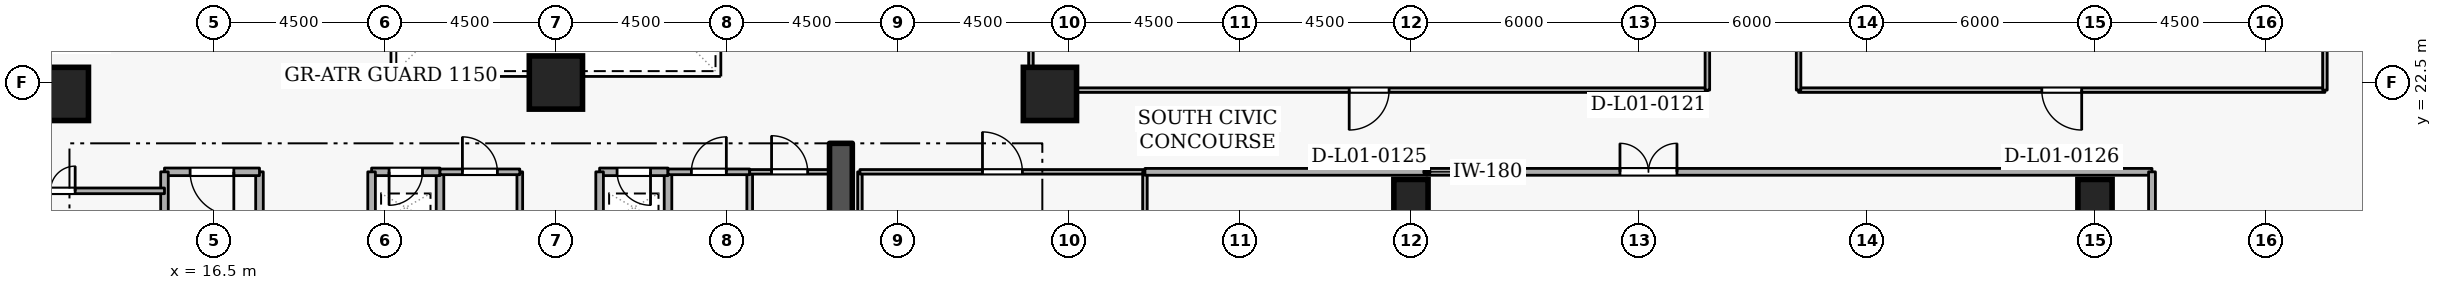
"""IFC4 building model, lengths in metres.
Left out: names, types, materials, properties, quantities, classifications, styles, units other than length and angle.
Written with IfcOpenShell. Run it as: python <this file> out.ifc"""

import sys

from ifc_helpers import new_model, si_unit, direction, frame, frame_2d, origin, origin_2d, place, context, subcontext, project, spatial, rectangle, extrude, element, fill, save


model = new_model("IFC4")
c1 = context("Model", 3, precision=1e-05, world=origin(), true_north=direction((0.0, 1.0)))
c2 = subcontext(c1, "Body", "Model", "MODEL_VIEW")
j1 = project(units=[si_unit("LENGTHUNIT", "METRE"), si_unit("PLANEANGLEUNIT", "RADIAN")], contexts=[c1])
p1 = place(None, origin())
s1 = spatial("IfcSite", under=j1, at=p1, CompositionType="ELEMENT")
p2 = place(p1, origin())
s2 = spatial("IfcBuilding", under=s1, at=p2, CompositionType="ELEMENT")
p3 = place(p2, frame((0.0, 0.0, 4.8)))
s3 = spatial("IfcBuildingStorey", under=s2, at=p3, CompositionType="ELEMENT", Elevation=4.8)
p4 = place(p3, frame((33.0, 15.2, 0.0), z_axis=(0.0, 0.0, 1.0), x_axis=(0.0, 1.0, 0.0)))
e1 = element("IfcWall", 1, at=p4, inside=s3, PredefinedType="SHEAR", context=c2, shape_type="SweptSolid", body=[
    extrude(rectangle(XDim=5.7, YDim=0.6, at=frame_2d((2.85, 0.0))), origin(), (0.0, 0.0, 1.0), 4.8),
])
for number, where, z_axis, x_axis in (
    (2, (12.5, 22.2, 0.0), (0.0, 0.0, 1.0), (1.0, 0.0, 0.0)),
    (3, (38.5, 22.2, 0.0), (0.0, 0.0, 1.0), (1.0, 0.0, 0.0)),
    (4, (25.5, 22.5, 0.0), (0.0, 0.0, 1.0), (1.0, 0.0, 0.0)),
):
    element("IfcColumn", number, at=place(p3, frame(where, z_axis=z_axis, x_axis=x_axis)), inside=s3, PredefinedType="COLUMN", context=c2, shape_type="SweptSolid", body=[
        extrude(rectangle(XDim=1.4, YDim=1.4, at=origin_2d()), origin(), (0.0, 0.0, 1.0), 4.8),
    ])
for number, where, z_axis, x_axis in (
    (5, (48.0, 19.5, 0.0), (0.0, 0.0, 1.0), (1.0, 0.0, 0.0)),
    (6, (66.0, 19.5, 0.0), (0.0, 0.0, 1.0), (1.0, 0.0, 0.0)),
):
    element("IfcColumn", number, at=place(p3, frame(where, z_axis=z_axis, x_axis=x_axis)), inside=s3, PredefinedType="COLUMN", context=c2, shape_type="SweptSolid", body=[
        extrude(rectangle(XDim=0.9, YDim=0.9, at=origin_2d()), origin(), (0.0, 0.0, 1.0), 4.8),
    ])
p5 = place(p3, frame((17.7, 18.4, 0.0), z_axis=(0.0, 0.0, 1.0), x_axis=(0.0, 1.0, 0.0)))
e7 = element("IfcWall", 7, at=p5, inside=s3, PredefinedType="STANDARD", context=c2, shape_type="SweptSolid", body=[
    extrude(rectangle(XDim=1.75, YDim=0.2, at=frame_2d((0.875, 0.0))), origin(), (0.0, 0.0, 1.0), 3.665),
])
p6 = place(p3, frame((17.7, 20.15, 0.0), z_axis=(0.0, 0.0, 1.0), x_axis=(-1.0, 0.0, 0.0)))
e8 = element("IfcWall", 8, at=p6, inside=s3, PredefinedType="STANDARD", context=c2, shape_type="SweptSolid", body=[
    extrude(rectangle(XDim=2.5, YDim=0.2, at=frame_2d((1.25, 0.0))), origin(), (0.0, 0.0, 1.0), 4.46),
])
p7 = place(p6, frame((0.675, 0.0, 0.0)))
e9 = element("IfcOpeningElement", 9, at=p7, cuts=e8, PredefinedType="OPENING", context=c2, shape_type="SweptSolid", body=[
    extrude(rectangle(XDim=1.15, YDim=2.1, at=frame_2d((0.575, 1.05))), frame((0.0, 0.11, 0.0), z_axis=(0.0, -1.0, 0.0), x_axis=(1.0, 0.0, 0.0)), (0.0, 0.0, 1.0), 0.22),
])
p8 = place(p3, frame((15.2, 20.15, 0.0), z_axis=(0.0, 0.0, 1.0), x_axis=(0.0, -1.0, 0.0)))
e10 = element("IfcWall", 10, at=p8, inside=s3, PredefinedType="STANDARD", context=c2, shape_type="SweptSolid", body=[
    extrude(rectangle(XDim=5.15, YDim=0.2, at=frame_2d((2.575, 0.0))), origin(), (0.0, 0.0, 1.0), 4.46),
])
p9 = place(p3, frame((28.45, 18.65, 0.0), z_axis=(0.0, 0.0, 1.0), x_axis=(0.0, 1.0, 0.0)))
e11 = element("IfcWall", 11, at=p9, inside=s3, PredefinedType="STANDARD", context=c2, shape_type="SweptSolid", body=[
    extrude(rectangle(XDim=1.5, YDim=0.2, at=frame_2d((0.75, 0.0))), origin(), (0.0, 0.0, 1.0), 4.46),
])
p10 = place(p3, frame((28.45, 20.15, 0.0), z_axis=(0.0, 0.0, 1.0), x_axis=(-1.0, 0.0, 0.0)))
e12 = element("IfcWall", 12, at=p10, inside=s3, PredefinedType="STANDARD", context=c2, shape_type="SweptSolid", body=[
    extrude(rectangle(XDim=1.8, YDim=0.2, at=frame_2d((0.9, 0.0))), origin(), (0.0, 0.0, 1.0), 4.46),
])
p11 = place(p10, frame((0.46, 0.0, 0.0)))
e13 = element("IfcOpeningElement", 13, at=p11, cuts=e12, PredefinedType="OPENING", context=c2, shape_type="SweptSolid", body=[
    extrude(rectangle(XDim=0.88, YDim=2.04, at=frame_2d((0.44, 1.02))), frame((0.0, 0.11, 0.0), z_axis=(0.0, -1.0, 0.0), x_axis=(1.0, 0.0, 0.0)), (0.0, 0.0, 1.0), 0.22),
])
for number, where, z_axis, x_axis in (
    (14, (26.65, 20.15, 0.0), (0.0, 0.0, 1.0), (0.0, -1.0, 0.0)),
    (15, (22.45, 18.65, 0.0), (0.0, 0.0, 1.0), (0.0, 1.0, 0.0)),
):
    element("IfcWall", number, at=place(p3, frame(where, z_axis=z_axis, x_axis=x_axis)), inside=s3, PredefinedType="STANDARD", context=c2, shape_type="SweptSolid", body=[
        extrude(rectangle(XDim=1.5, YDim=0.2, at=frame_2d((0.75, 0.0))), origin(), (0.0, 0.0, 1.0), 4.46),
    ])
p12 = place(p3, frame((22.45, 20.15, 0.0), z_axis=(0.0, 0.0, 1.0), x_axis=(-1.0, 0.0, 0.0)))
e16 = element("IfcWall", 16, at=p12, inside=s3, PredefinedType="STANDARD", context=c2, shape_type="SweptSolid", body=[
    extrude(rectangle(XDim=1.8, YDim=0.2, at=frame_2d((0.9, 0.0))), origin(), (0.0, 0.0, 1.0), 4.46),
])
p13 = place(p12, frame((0.46, 0.0, 0.0)))
e17 = element("IfcOpeningElement", 17, at=p13, cuts=e16, PredefinedType="OPENING", context=c2, shape_type="SweptSolid", body=[
    extrude(rectangle(XDim=0.88, YDim=2.04, at=frame_2d((0.44, 1.02))), frame((0.0, 0.11, 0.0), z_axis=(0.0, -1.0, 0.0), x_axis=(1.0, 0.0, 0.0)), (0.0, 0.0, 1.0), 0.22),
])
p14 = place(p3, frame((20.65, 20.15, 0.0), z_axis=(0.0, 0.0, 1.0), x_axis=(0.0, -1.0, 0.0)))
e18 = element("IfcWall", 18, at=p14, inside=s3, PredefinedType="STANDARD", context=c2, shape_type="SweptSolid", body=[
    extrude(rectangle(XDim=1.5, YDim=0.2, at=frame_2d((0.75, 0.0))), origin(), (0.0, 0.0, 1.0), 4.46),
])
p15 = place(p3, frame((24.55, 20.15, 0.0), z_axis=(0.0, 0.0, 1.0), x_axis=(0.0, -1.0, 0.0)))
e19 = element("IfcWall", 19, at=p15, inside=s3, PredefinedType="PARTITIONING", context=c2, shape_type="SweptSolid", body=[
    extrude(rectangle(XDim=1.5, YDim=0.15, at=frame_2d((0.75, 0.0))), origin(), (0.0, 0.0, 1.0), 4.46),
])
p16 = place(p3, frame((22.45, 20.15, 0.0), z_axis=(0.0, 0.0, 1.0), x_axis=(1.0, 0.0, 0.0)))
e20 = element("IfcWall", 20, at=p16, inside=s3, PredefinedType="PARTITIONING", context=c2, shape_type="SweptSolid", body=[
    extrude(rectangle(XDim=2.1, YDim=0.15, at=frame_2d((1.05, 0.0))), origin(), (0.0, 0.0, 1.0), 4.46),
])
p17 = place(p16, frame((0.59, 0.0, 0.0)))
e21 = element("IfcOpeningElement", 21, at=p17, cuts=e20, PredefinedType="OPENING", context=c2, shape_type="SweptSolid", body=[
    extrude(rectangle(XDim=0.92, YDim=2.08, at=frame_2d((0.46, 1.04))), frame((0.0, 0.085, 0.0), z_axis=(0.0, -1.0, 0.0), x_axis=(1.0, 0.0, 0.0)), (0.0, 0.0, 1.0), 0.17),
])
p18 = place(p3, frame((30.6, 20.15, 0.0), z_axis=(0.0, 0.0, 1.0), x_axis=(0.0, -1.0, 0.0)))
e22 = element("IfcWall", 22, at=p18, inside=s3, PredefinedType="PARTITIONING", context=c2, shape_type="SweptSolid", body=[
    extrude(rectangle(XDim=1.5, YDim=0.15, at=frame_2d((0.75, 0.0))), origin(), (0.0, 0.0, 1.0), 4.46),
])
p19 = place(p3, frame((28.45, 20.15, 0.0), z_axis=(0.0, 0.0, 1.0), x_axis=(1.0, 0.0, 0.0)))
e23 = element("IfcWall", 23, at=p19, inside=s3, PredefinedType="PARTITIONING", context=c2, shape_type="SweptSolid", body=[
    extrude(rectangle(XDim=2.15, YDim=0.15, at=frame_2d((1.075, 0.0))), origin(), (0.0, 0.0, 1.0), 4.46),
])
p20 = place(p19, frame((0.615, 0.0, 0.0)))
e24 = element("IfcOpeningElement", 24, at=p20, cuts=e23, PredefinedType="OPENING", context=c2, shape_type="SweptSolid", body=[
    extrude(rectangle(XDim=0.92, YDim=2.08, at=frame_2d((0.46, 1.04))), frame((0.0, 0.085, 0.0), z_axis=(0.0, -1.0, 0.0), x_axis=(1.0, 0.0, 0.0)), (0.0, 0.0, 1.0), 0.17),
])
p21 = place(p3, frame((30.6, 20.15, 0.0), z_axis=(0.0, 0.0, 1.0), x_axis=(1.0, 0.0, 0.0)))
e25 = element("IfcWall", 25, at=p21, inside=s3, PredefinedType="PARTITIONING", context=c2, shape_type="SweptSolid", body=[
    extrude(rectangle(XDim=2.1, YDim=0.12, at=frame_2d((1.05, 0.0))), origin(), (0.0, 0.0, 1.0), 4.46),
])
p22 = place(p21, frame((0.575, 0.0, 0.0)))
e26 = element("IfcOpeningElement", 26, at=p22, cuts=e25, PredefinedType="OPENING", context=c2, shape_type="SweptSolid", body=[
    extrude(rectangle(XDim=0.95, YDim=2.1, at=frame_2d((0.475, 1.05))), frame((0.0, 0.07, 0.0), z_axis=(0.0, -1.0, 0.0), x_axis=(1.0, 0.0, 0.0)), (0.0, 0.0, 1.0), 0.14),
])
p23 = place(p3, frame((9.2, 19.65, 0.0), z_axis=(0.0, 0.0, 1.0), x_axis=(1.0, 0.0, 0.0)))
e27 = element("IfcWall", 27, at=p23, inside=s3, PredefinedType="PARTITIONING", context=c2, shape_type="SweptSolid", body=[
    extrude(rectangle(XDim=6.0, YDim=0.15, at=frame_2d((3.0, 0.0))), origin(), (0.0, 0.0, 1.0), 4.46),
])
p24 = place(p23, frame((2.35, 0.0, 0.0)))
e28 = element("IfcOpeningElement", 28, at=p24, cuts=e27, PredefinedType="OPENING", context=c2, shape_type="SweptSolid", body=[
    extrude(rectangle(XDim=1.3, YDim=2.12, at=frame_2d((0.65, 1.06))), frame((0.0, 0.085, 0.0), z_axis=(0.0, -1.0, 0.0), x_axis=(1.0, 0.0, 0.0)), (0.0, 0.0, 1.0), 0.17),
])
p25 = place(p3, frame((33.5, 17.648, 0.0), z_axis=(0.0, 0.0, 1.0), x_axis=(0.0, 1.0, 0.0)))
e29 = element("IfcWall", 29, at=p25, inside=s3, PredefinedType="PARTITIONING", context=c2, shape_type="SweptSolid", body=[
    extrude(rectangle(XDim=2.502, YDim=0.12, at=frame_2d((1.251, 0.0))), origin(), (0.0, 0.0, 1.0), 4.46),
])
p26 = place(p3, frame((33.5, 20.15, 0.0), z_axis=(0.0, 0.0, 1.0), x_axis=(1.0, 0.0, 0.0)))
e30 = element("IfcWall", 30, at=p26, inside=s3, PredefinedType="PARTITIONING", context=c2, shape_type="SweptSolid", body=[
    extrude(rectangle(XDim=7.5, YDim=0.12, at=frame_2d((3.75, 0.0))), origin(), (0.0, 0.0, 1.0), 4.46),
])
p27 = place(p26, frame((3.225, 0.0, 0.0)))
e31 = element("IfcOpeningElement", 31, at=p27, cuts=e30, PredefinedType="OPENING", context=c2, shape_type="SweptSolid", body=[
    extrude(rectangle(XDim=1.05, YDim=2.1, at=frame_2d((0.525, 1.05))), frame((0.0, 0.07, 0.0), z_axis=(0.0, -1.0, 0.0), x_axis=(1.0, 0.0, 0.0)), (0.0, 0.0, 1.0), 0.14),
])
p28 = place(p3, frame((41.0, 20.15, 0.0), z_axis=(0.0, 0.0, 1.0), x_axis=(0.0, -1.0, 0.0)))
e32 = element("IfcWall", 32, at=p28, inside=s3, PredefinedType="PARTITIONING", context=c2, shape_type="SweptSolid", body=[
    extrude(rectangle(XDim=13.83, YDim=0.12, at=frame_2d((6.915, 0.0))), origin(), (0.0, 0.0, 1.0), 4.46),
])
p29 = place(p3, frame((41.0, 20.15, 0.0), z_axis=(0.0, 0.0, 1.0), x_axis=(1.0, 0.0, 0.0)))
e33 = element("IfcWall", 33, at=p29, inside=s3, PredefinedType="PARTITIONING", context=c2, shape_type="SweptSolid", body=[
    extrude(rectangle(XDim=26.5, YDim=0.18, at=frame_2d((13.25, 0.0))), origin(), (0.0, 0.0, 1.0), 4.46),
])
p30 = place(p29, frame((12.5, 0.0, 0.0)))
e34 = element("IfcOpeningElement", 34, at=p30, cuts=e33, PredefinedType="OPENING", context=c2, shape_type="SweptSolid", body=[
    extrude(rectangle(XDim=1.5, YDim=2.15, at=frame_2d((0.75, 1.075))), frame((0.0, 0.1, 0.0), z_axis=(0.0, -1.0, 0.0), x_axis=(1.0, 0.0, 0.0)), (0.0, 0.0, 1.0), 0.2),
])
p31 = place(p3, frame((67.5, 20.15, 0.0), z_axis=(0.0, 0.0, 1.0), x_axis=(0.0, -1.0, 0.0)))
e35 = element("IfcWall", 35, at=p31, inside=s3, PredefinedType="PARTITIONING", context=c2, shape_type="SweptSolid", body=[
    extrude(rectangle(XDim=13.83, YDim=0.18, at=frame_2d((6.915, 0.0))), origin(), (0.0, 0.0, 1.0), 4.46),
])
p32 = place(p3, frame((55.8, 22.3, 0.0), z_axis=(0.0, 0.0, 1.0), x_axis=(-1.0, 0.0, 0.0)))
e36 = element("IfcWall", 36, at=p32, inside=s3, PredefinedType="PARTITIONING", context=c2, shape_type="SweptSolid", body=[
    extrude(rectangle(XDim=17.8, YDim=0.12, at=frame_2d((8.9, 0.0))), origin(), (0.0, 0.0, 1.0), 4.46),
])
p33 = place(p32, frame((8.375, 0.0, 0.0)))
e37 = element("IfcOpeningElement", 37, at=p33, cuts=e36, PredefinedType="OPENING", context=c2, shape_type="SweptSolid", body=[
    extrude(rectangle(XDim=1.05, YDim=2.1, at=frame_2d((0.525, 1.05))), frame((0.0, 0.07, 0.0), z_axis=(0.0, -1.0, 0.0), x_axis=(1.0, 0.0, 0.0)), (0.0, 0.0, 1.0), 0.14),
])
for number, where, z_axis, x_axis in (
    (38, (38.0, 22.3, 0.0), (0.0, 0.0, 1.0), (0.0, 1.0, 0.0)),
    (39, (55.8, 32.28, 0.0), (0.0, 0.0, 1.0), (0.0, -1.0, 0.0)),
):
    element("IfcWall", number, at=place(p3, frame(where, z_axis=z_axis, x_axis=x_axis)), inside=s3, PredefinedType="PARTITIONING", context=c2, shape_type="SweptSolid", body=[
        extrude(rectangle(XDim=9.98, YDim=0.12, at=frame_2d((4.99, 0.0))), origin(), (0.0, 0.0, 1.0), 4.46),
    ])
p34 = place(p3, frame((72.05, 22.3, 0.0), z_axis=(0.0, 0.0, 1.0), x_axis=(-1.0, 0.0, 0.0)))
e40 = element("IfcWall", 40, at=p34, inside=s3, PredefinedType="PARTITIONING", context=c2, shape_type="SweptSolid", body=[
    extrude(rectangle(XDim=13.85, YDim=0.12, at=frame_2d((6.925, 0.0))), origin(), (0.0, 0.0, 1.0), 4.46),
])
p35 = place(p34, frame((6.4, 0.0, 0.0)))
e41 = element("IfcOpeningElement", 41, at=p35, cuts=e40, PredefinedType="OPENING", context=c2, shape_type="SweptSolid", body=[
    extrude(rectangle(XDim=1.05, YDim=2.1, at=frame_2d((0.525, 1.05))), frame((0.0, 0.07, 0.0), z_axis=(0.0, -1.0, 0.0), x_axis=(1.0, 0.0, 0.0)), (0.0, 0.0, 1.0), 0.14),
])
for number, where, z_axis, x_axis in (
    (42, (58.2, 22.3, 0.0), (0.0, 0.0, 1.0), (0.0, 1.0, 0.0)),
    (43, (72.05, 32.28, 0.0), (0.0, 0.0, 1.0), (0.0, -1.0, 0.0)),
):
    element("IfcWall", number, at=place(p3, frame(where, z_axis=z_axis, x_axis=x_axis)), inside=s3, PredefinedType="PARTITIONING", context=c2, shape_type="SweptSolid", body=[
        extrude(rectangle(XDim=9.98, YDim=0.12, at=frame_2d((4.99, 0.0))), origin(), (0.0, 0.0, 1.0), 4.46),
    ])
p36 = place(p7, origin())
e44 = element("IfcDoor", 44, at=p36, inside=s3, OperationType="SINGLE_SWING_LEFT", PredefinedType="DOOR", context=c2, shape_type="SweptSolid", body=[
    extrude(rectangle(XDim=1.15, YDim=2.1, at=frame_2d((0.575, 1.05))), frame((0.0, 0.025, 0.0), z_axis=(0.0, -1.0, 0.0), x_axis=(1.0, 0.0, 0.0)), (0.0, 0.0, 1.0), 0.05),
])
fill(e9, e44)
p37 = place(p11, origin())
e45 = element("IfcDoor", 45, at=p37, inside=s3, OperationType="SINGLE_SWING_LEFT", PredefinedType="DOOR", context=c2, shape_type="SweptSolid", body=[
    extrude(rectangle(XDim=0.88, YDim=2.04, at=frame_2d((0.44, 1.02))), frame((0.0, 0.025, 0.0), z_axis=(0.0, -1.0, 0.0), x_axis=(1.0, 0.0, 0.0)), (0.0, 0.0, 1.0), 0.05),
])
fill(e13, e45)
p38 = place(p13, origin())
e46 = element("IfcDoor", 46, at=p38, inside=s3, OperationType="SINGLE_SWING_RIGHT", PredefinedType="DOOR", context=c2, shape_type="SweptSolid", body=[
    extrude(rectangle(XDim=0.88, YDim=2.04, at=frame_2d((0.44, 1.02))), frame((0.0, 0.025, 0.0), z_axis=(0.0, -1.0, 0.0), x_axis=(1.0, 0.0, 0.0)), (0.0, 0.0, 1.0), 0.05),
])
fill(e17, e46)
p39 = place(p17, origin())
e47 = element("IfcDoor", 47, at=p39, inside=s3, OperationType="SINGLE_SWING_LEFT", PredefinedType="DOOR", context=c2, shape_type="SweptSolid", body=[
    extrude(rectangle(XDim=0.92, YDim=2.08, at=frame_2d((0.46, 1.04))), frame((0.0, 0.025, 0.0), z_axis=(0.0, -1.0, 0.0), x_axis=(1.0, 0.0, 0.0)), (0.0, 0.0, 1.0), 0.05),
])
fill(e21, e47)
p40 = place(p20, origin())
e48 = element("IfcDoor", 48, at=p40, inside=s3, OperationType="SINGLE_SWING_RIGHT", PredefinedType="DOOR", context=c2, shape_type="SweptSolid", body=[
    extrude(rectangle(XDim=0.92, YDim=2.08, at=frame_2d((0.46, 1.04))), frame((0.0, 0.025, 0.0), z_axis=(0.0, -1.0, 0.0), x_axis=(1.0, 0.0, 0.0)), (0.0, 0.0, 1.0), 0.05),
])
fill(e24, e48)
p41 = place(p22, origin())
e49 = element("IfcDoor", 49, at=p41, inside=s3, OperationType="SINGLE_SWING_LEFT", PredefinedType="DOOR", context=c2, shape_type="SweptSolid", body=[
    extrude(rectangle(XDim=0.95, YDim=2.1, at=frame_2d((0.475, 1.05))), frame((0.0, 0.025, 0.0), z_axis=(0.0, -1.0, 0.0), x_axis=(1.0, 0.0, 0.0)), (0.0, 0.0, 1.0), 0.05),
])
fill(e26, e49)
p42 = place(p24, origin())
e50 = element("IfcDoor", 50, at=p42, inside=s3, OperationType="DOUBLE_DOOR_SINGLE_SWING", PredefinedType="DOOR", context=c2, shape_type="SweptSolid", body=[
    extrude(rectangle(XDim=1.3, YDim=2.12, at=frame_2d((0.65, 1.06))), frame((0.0, 0.025, 0.0), z_axis=(0.0, -1.0, 0.0), x_axis=(1.0, 0.0, 0.0)), (0.0, 0.0, 1.0), 0.05),
])
fill(e28, e50)
p43 = place(p27, origin())
e51 = element("IfcDoor", 51, at=p43, inside=s3, OperationType="SINGLE_SWING_LEFT", PredefinedType="DOOR", context=c2, shape_type="SweptSolid", body=[
    extrude(rectangle(XDim=1.05, YDim=2.1, at=frame_2d((0.525, 1.05))), frame((0.0, 0.025, 0.0), z_axis=(0.0, -1.0, 0.0), x_axis=(1.0, 0.0, 0.0)), (0.0, 0.0, 1.0), 0.05),
])
fill(e31, e51)
p44 = place(p30, origin())
e52 = element("IfcDoor", 52, at=p44, inside=s3, OperationType="DOUBLE_DOOR_SINGLE_SWING", PredefinedType="DOOR", context=c2, shape_type="SweptSolid", body=[
    extrude(rectangle(XDim=1.5, YDim=2.15, at=frame_2d((0.75, 1.075))), frame((0.0, 0.025, 0.0), z_axis=(0.0, -1.0, 0.0), x_axis=(1.0, 0.0, 0.0)), (0.0, 0.0, 1.0), 0.05),
])
fill(e34, e52)
p45 = place(p33, origin())
e53 = element("IfcDoor", 53, at=p45, inside=s3, OperationType="SINGLE_SWING_RIGHT", PredefinedType="DOOR", context=c2, shape_type="SweptSolid", body=[
    extrude(rectangle(XDim=1.05, YDim=2.1, at=frame_2d((0.525, 1.05))), frame((0.0, 0.025, 0.0), z_axis=(0.0, -1.0, 0.0), x_axis=(1.0, 0.0, 0.0)), (0.0, 0.0, 1.0), 0.05),
])
fill(e37, e53)
p46 = place(p35, origin())
e54 = element("IfcDoor", 54, at=p46, inside=s3, OperationType="SINGLE_SWING_LEFT", PredefinedType="DOOR", context=c2, shape_type="SweptSolid", body=[
    extrude(rectangle(XDim=1.05, YDim=2.1, at=frame_2d((0.525, 1.05))), frame((0.0, 0.025, 0.0), z_axis=(0.0, -1.0, 0.0), x_axis=(1.0, 0.0, 0.0)), (0.0, 0.0, 1.0), 0.05),
])
fill(e41, e54)
save(model, sys.argv[1])
